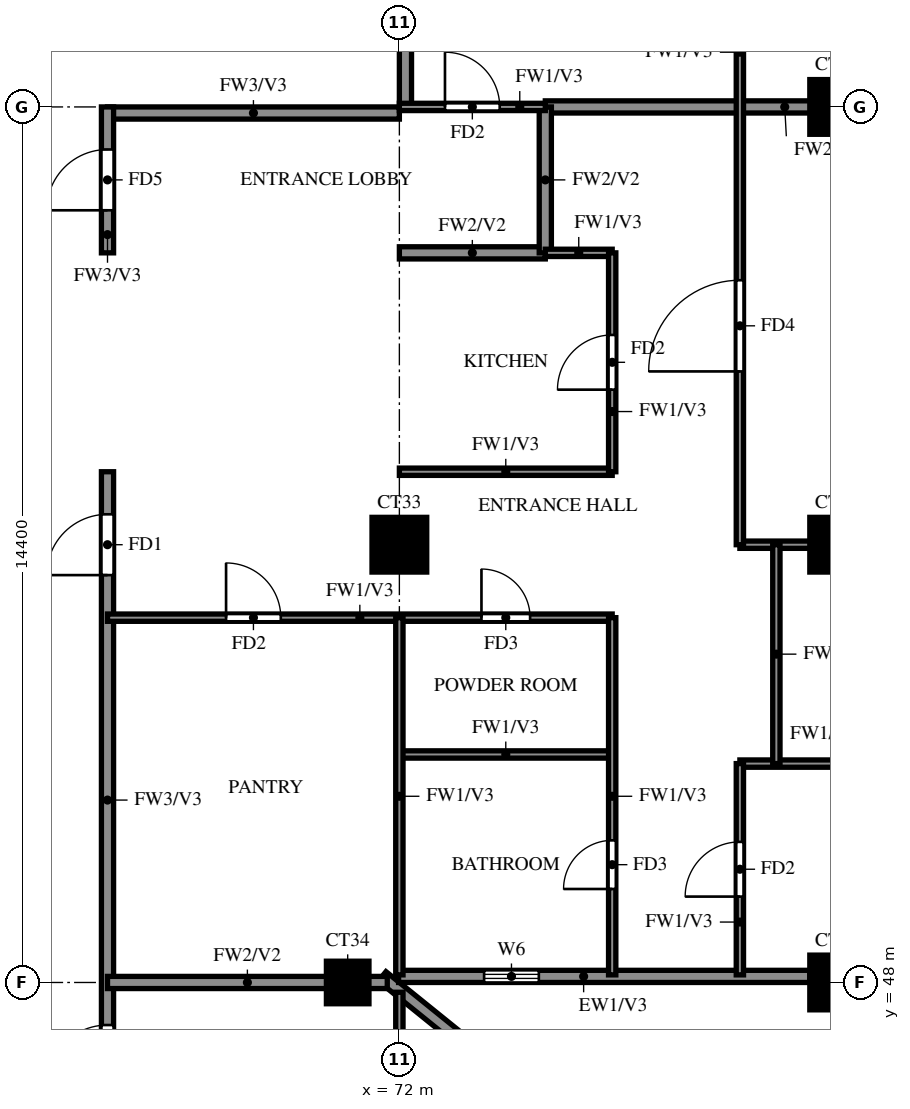
"""IFC4 building model, lengths in metres.
Left out: names, types, materials, properties, quantities, classifications, styles, units other than length and angle.
Written with IfcOpenShell. Run it as: python <this file> out.ifc"""

import sys

from ifc_helpers import new_model, si_unit, direction, frame, frame_2d, origin, origin_2d, place, context, subcontext, project, spatial, rectangle, extrude, source, transform, mapped, element, fill, save


model = new_model("IFC4")
c1 = context("Model", 3, precision=1e-05, world=origin(), true_north=direction((0.0, 1.0)))
c2 = subcontext(c1, "Body", "Model", "MODEL_VIEW")
j1 = project(units=[si_unit("LENGTHUNIT", "METRE"), si_unit("PLANEANGLEUNIT", "RADIAN")], contexts=[c1])
p1 = place(None, origin())
s1 = spatial("IfcSite", under=j1, at=p1, CompositionType="ELEMENT")
p2 = place(p1, origin())
s2 = spatial("IfcBuilding", under=s1, at=p2, CompositionType="ELEMENT")
p3 = place(p2, frame((0.0, 0.0, 229.0)))
s3 = spatial("IfcBuildingStorey", under=s2, at=p3, CompositionType="ELEMENT", Elevation=229.0)
m1 = source(origin(), c2, "Body", "SweptSolid", [
    extrude(rectangle(XDim=0.7, YDim=0.7, at=origin_2d()), origin(), (0.0, 0.0, 1.0), 3.22),
])
p4 = place(p3, frame((71.15, 48.0, 0.0), z_axis=(0.0, 0.0, 1.0), x_axis=(1.0, 0.0, 0.0)))
e1 = element("IfcColumn", 1, at=p4, inside=s3, PredefinedType="COLUMN", context=c2, shape_type="MappedRepresentation", body=[
    mapped(m1, transform((0.0, 0.0, 0.0))),
])
m2 = source(origin(), c2, "Body", "SweptSolid", [
    extrude(rectangle(XDim=0.9, YDim=0.9, at=origin_2d()), origin(), (0.0, 0.0, 1.0), 3.22),
])
for number, where, z_axis, x_axis in (
    (2, (79.2, 48.0, 0.0), (0.0, 0.0, 1.0), (1.0, 0.0, 0.0)),
    (3, (72.0, 55.2, 0.0), (0.0, 0.0, 1.0), (1.0, 0.0, 0.0)),
    (4, (79.2, 55.2, 0.0), (0.0, 0.0, 1.0), (1.0, 0.0, 0.0)),
    (5, (79.2, 62.4, 0.0), (0.0, 0.0, 1.0), (1.0, 0.0, 0.0)),
):
    element("IfcColumn", number, at=place(p3, frame(where, z_axis=z_axis, x_axis=x_axis)), inside=s3, PredefinedType="COLUMN", context=c2, shape_type="MappedRepresentation", body=[
        mapped(m2, transform((0.0, 0.0, 0.0))),
    ])
p5 = place(p3, frame((81.907, 39.87, 0.0), z_axis=(0.0, 0.0, 1.0), x_axis=(-0.777936274417, 0.62834318087, 0.0)))
e6 = element("IfcWall", 6, at=p5, inside=s3, PredefinedType="SOLIDWALL", context=c2, shape_type="SweptSolid", body=[
    extrude(rectangle(XDim=13.099, YDim=0.2, at=frame_2d((6.549, 0.0))), origin(), (0.0, 0.0, 1.0), 3.22),
])
p6 = place(p5, frame((9.938, 0.0, 1.5)))
e7 = element("IfcOpeningElement", 7, at=p6, cuts=e6, PredefinedType="OPENING", context=c2, shape_type="SweptSolid", body=[
    extrude(rectangle(XDim=0.9, YDim=0.9, at=frame_2d((0.45, 0.45))), frame((0.0, 0.11, 0.0), z_axis=(0.0, -1.0, 0.0), x_axis=(1.0, 0.0, 0.0)), (0.0, 0.0, 1.0), 0.22),
])
p7 = place(p3, frame((71.987, 48.1, 0.0), z_axis=(0.0, 0.0, 1.0), x_axis=(1.0, 0.0, 0.0)))
e8 = element("IfcWall", 8, at=p7, inside=s3, PredefinedType="SOLIDWALL", context=c2, shape_type="SweptSolid", body=[
    extrude(rectangle(XDim=6.763, YDim=0.2, at=frame_2d((3.381, 0.0))), origin(), (0.0, 0.0, 1.0), 3.22),
])
p8 = place(p7, frame((1.406, 0.0, 1.5)))
e9 = element("IfcOpeningElement", 9, at=p8, cuts=e8, PredefinedType="OPENING", context=c2, shape_type="SweptSolid", body=[
    extrude(rectangle(XDim=0.9, YDim=0.9, at=frame_2d((0.45, 0.45))), frame((0.0, 0.11, 0.0), z_axis=(0.0, -1.0, 0.0), x_axis=(1.0, 0.0, 0.0)), (0.0, 0.0, 1.0), 0.22),
])
p9 = place(p3, frame((67.2, 62.3, 0.0), z_axis=(0.0, 0.0, 1.0), x_axis=(1.0, 0.0, 0.0)))
e10 = element("IfcWall", 10, at=p9, inside=s3, PredefinedType="SOLIDWALL", context=c2, shape_type="SweptSolid", body=[
    extrude(rectangle(XDim=4.8, YDim=0.2, at=frame_2d((2.4, 0.0))), origin(), (0.0, 0.0, 1.0), 3.22),
])
p10 = place(p3, frame((67.2, 45.6, 0.0), z_axis=(0.0, 0.0, 1.0), x_axis=(0.0, 1.0, 0.0)))
e11 = element("IfcWall", 11, at=p10, inside=s3, PredefinedType="SOLIDWALL", context=c2, shape_type="SweptSolid", body=[
    extrude(rectangle(XDim=10.8, YDim=0.2, at=frame_2d((5.4, 0.0))), origin(), (0.0, 0.0, 1.0), 3.22),
])
p11 = place(p10, frame((9.1, 0.0, 0.0)))
e12 = element("IfcOpeningElement", 12, at=p11, cuts=e11, PredefinedType="OPENING", context=c2, shape_type="SweptSolid", body=[
    extrude(rectangle(XDim=1.0, YDim=2.1, at=frame_2d((0.5, 1.05))), frame((0.0, 0.11, 0.0), z_axis=(0.0, -1.0, 0.0), x_axis=(1.0, 0.0, 0.0)), (0.0, 0.0, 1.0), 0.22),
])
p12 = place(p10, frame((0.7, 0.0, 0.0)))
e13 = element("IfcOpeningElement", 13, at=p12, cuts=e11, PredefinedType="OPENING", context=c2, shape_type="SweptSolid", body=[
    extrude(rectangle(XDim=1.0, YDim=2.1, at=frame_2d((0.5, 1.05))), frame((0.0, 0.11, 0.0), z_axis=(0.0, -1.0, 0.0), x_axis=(1.0, 0.0, 0.0)), (0.0, 0.0, 1.0), 0.22),
])
p13 = place(p3, frame((67.2, 60.0, 0.0), z_axis=(0.0, 0.0, 1.0), x_axis=(0.0, 1.0, 0.0)))
e14 = element("IfcWall", 14, at=p13, inside=s3, PredefinedType="SOLIDWALL", context=c2, shape_type="SweptSolid", body=[
    extrude(rectangle(XDim=2.4, YDim=0.2, at=frame_2d((1.2, 0.0))), origin(), (0.0, 0.0, 1.0), 3.22),
])
p14 = place(p13, frame((0.7, 0.0, 0.0)))
e15 = element("IfcOpeningElement", 15, at=p14, cuts=e14, PredefinedType="OPENING", context=c2, shape_type="SweptSolid", body=[
    extrude(rectangle(XDim=1.0, YDim=2.1, at=frame_2d((0.5, 1.05))), frame((0.0, 0.11, 0.0), z_axis=(0.0, -1.0, 0.0), x_axis=(1.0, 0.0, 0.0)), (0.0, 0.0, 1.0), 0.22),
])
p15 = place(p3, frame((72.1, 62.4, 0.0), z_axis=(0.0, 0.0, 1.0), x_axis=(0.0, 1.0, 0.0)))
e16 = element("IfcWall", 16, at=p15, inside=s3, PredefinedType="SOLIDWALL", context=c2, shape_type="SweptSolid", body=[
    extrude(rectangle(XDim=15.6, YDim=0.2, at=frame_2d((7.8, 0.0))), origin(), (0.0, 0.0, 1.0), 3.22),
])
p16 = place(p3, frame((67.2, 48.0, 0.0), z_axis=(0.0, 0.0, 1.0), x_axis=(1.0, 0.0, 0.0)))
e17 = element("IfcWall", 17, at=p16, inside=s3, PredefinedType="SOLIDWALL", context=c2, shape_type="SweptSolid", body=[
    extrude(rectangle(XDim=4.601, YDim=0.2, at=frame_2d((2.301, 0.0))), origin(), (0.0, 0.0, 1.0), 3.22),
])
p17 = place(p3, frame((72.0, 60.0, 0.0), z_axis=(0.0, 0.0, 1.0), x_axis=(1.0, 0.0, 0.0)))
e18 = element("IfcWall", 18, at=p17, inside=s3, PredefinedType="SOLIDWALL", context=c2, shape_type="SweptSolid", body=[
    extrude(rectangle(XDim=2.4, YDim=0.2, at=frame_2d((1.2, 0.0))), origin(), (0.0, 0.0, 1.0), 3.22),
])
p18 = place(p3, frame((74.4, 62.4, 0.0), z_axis=(0.0, 0.0, 1.0), x_axis=(1.0, 0.0, 0.0)))
e19 = element("IfcWall", 19, at=p18, inside=s3, PredefinedType="SOLIDWALL", context=c2, shape_type="SweptSolid", body=[
    extrude(rectangle(XDim=7.875, YDim=0.2, at=frame_2d((3.938, 0.0))), origin(), (0.0, 0.0, 1.0), 3.22),
])
p19 = place(p3, frame((74.4, 60.0, 0.0), z_axis=(0.0, 0.0, 1.0), x_axis=(0.0, 1.0, 0.0)))
e20 = element("IfcWall", 20, at=p19, inside=s3, PredefinedType="SOLIDWALL", context=c2, shape_type="SweptSolid", body=[
    extrude(rectangle(XDim=2.4, YDim=0.2, at=frame_2d((1.2, 0.0))), origin(), (0.0, 0.0, 1.0), 3.22),
])
p20 = place(p3, frame((77.6, 51.6, 0.0), z_axis=(0.0, 0.0, 1.0), x_axis=(1.0, 0.0, 0.0)))
e21 = element("IfcWall", 21, at=p20, inside=s3, PredefinedType="PARTITIONING", context=c2, shape_type="SweptSolid", body=[
    extrude(rectangle(XDim=4.675, YDim=0.12, at=frame_2d((2.337, 0.0))), origin(), (0.0, 0.0, 1.0), 2.32),
])
p21 = place(p20, frame((2.238, 0.0, 0.0)))
e22 = element("IfcOpeningElement", 22, at=p21, cuts=e21, PredefinedType="OPENING", context=c2, shape_type="SweptSolid", body=[
    extrude(rectangle(XDim=0.8, YDim=2.1, at=frame_2d((0.4, 1.05))), frame((0.0, 0.07, 0.0), z_axis=(0.0, -1.0, 0.0), x_axis=(1.0, 0.0, 0.0)), (0.0, 0.0, 1.0), 0.14),
])
p22 = place(p3, frame((72.0, 51.75, 0.0), z_axis=(0.0, 0.0, 1.0), x_axis=(1.0, 0.0, 0.0)))
e23 = element("IfcWall", 23, at=p22, inside=s3, PredefinedType="PARTITIONING", context=c2, shape_type="SweptSolid", body=[
    extrude(rectangle(XDim=3.5, YDim=0.12, at=frame_2d((1.75, 0.0))), origin(), (0.0, 0.0, 1.0), 3.22),
])
p23 = place(p3, frame((67.2, 54.0, 0.0), z_axis=(0.0, 0.0, 1.0), x_axis=(1.0, 0.0, 0.0)))
e24 = element("IfcWall", 24, at=p23, inside=s3, PredefinedType="PARTITIONING", context=c2, shape_type="SweptSolid", body=[
    extrude(rectangle(XDim=8.3, YDim=0.12, at=frame_2d((4.15, 0.0))), origin(), (0.0, 0.0, 1.0), 3.22),
])
p24 = place(p23, frame((6.15, 0.0, 0.0)))
e25 = element("IfcOpeningElement", 25, at=p24, cuts=e24, PredefinedType="OPENING", context=c2, shape_type="SweptSolid", body=[
    extrude(rectangle(XDim=0.8, YDim=2.1, at=frame_2d((0.4, 1.05))), frame((0.0, 0.07, 0.0), z_axis=(0.0, -1.0, 0.0), x_axis=(1.0, 0.0, 0.0)), (0.0, 0.0, 1.0), 0.14),
])
p25 = place(p23, frame((1.95, 0.0, 0.0)))
e26 = element("IfcOpeningElement", 26, at=p25, cuts=e24, PredefinedType="OPENING", context=c2, shape_type="SweptSolid", body=[
    extrude(rectangle(XDim=0.9, YDim=2.1, at=frame_2d((0.45, 1.05))), frame((0.0, 0.07, 0.0), z_axis=(0.0, -1.0, 0.0), x_axis=(1.0, 0.0, 0.0)), (0.0, 0.0, 1.0), 0.14),
])
p26 = place(p3, frame((77.6, 55.2, 0.0), z_axis=(0.0, 0.0, 1.0), x_axis=(1.0, 0.0, 0.0)))
e27 = element("IfcWall", 27, at=p26, inside=s3, PredefinedType="PARTITIONING", context=c2, shape_type="SweptSolid", body=[
    extrude(rectangle(XDim=4.675, YDim=0.12, at=frame_2d((2.337, 0.0))), origin(), (0.0, 0.0, 1.0), 3.22),
])
p27 = place(p3, frame((72.0, 56.4, 0.0), z_axis=(0.0, 0.0, 1.0), x_axis=(1.0, 0.0, 0.0)))
e28 = element("IfcWall", 28, at=p27, inside=s3, PredefinedType="PARTITIONING", context=c2, shape_type="SweptSolid", body=[
    extrude(rectangle(XDim=3.5, YDim=0.12, at=frame_2d((1.75, 0.0))), origin(), (0.0, 0.0, 1.0), 3.22),
])
p28 = place(p3, frame((74.4, 60.0, 0.0), z_axis=(0.0, 0.0, 1.0), x_axis=(1.0, 0.0, 0.0)))
e29 = element("IfcWall", 29, at=p28, inside=s3, PredefinedType="PARTITIONING", context=c2, shape_type="SweptSolid", body=[
    extrude(rectangle(XDim=1.1, YDim=0.12, at=frame_2d((0.55, 0.0))), origin(), (0.0, 0.0, 1.0), 3.22),
])
p29 = place(p3, frame((72.0, 62.4, 0.0), z_axis=(0.0, 0.0, 1.0), x_axis=(1.0, 0.0, 0.0)))
e30 = element("IfcWall", 30, at=p29, inside=s3, PredefinedType="PARTITIONING", context=c2, shape_type="SweptSolid", body=[
    extrude(rectangle(XDim=2.4, YDim=0.12, at=frame_2d((1.2, 0.0))), origin(), (0.0, 0.0, 1.0), 3.22),
])
p30 = place(p29, frame((0.75, 0.0, 0.0)))
e31 = element("IfcOpeningElement", 31, at=p30, cuts=e30, PredefinedType="OPENING", context=c2, shape_type="SweptSolid", body=[
    extrude(rectangle(XDim=0.9, YDim=2.1, at=frame_2d((0.45, 1.05))), frame((0.0, 0.07, 0.0), z_axis=(0.0, -1.0, 0.0), x_axis=(1.0, 0.0, 0.0)), (0.0, 0.0, 1.0), 0.14),
])
p31 = place(p3, frame((72.0, 39.725, 0.0), z_axis=(0.0, 0.0, 1.0), x_axis=(0.0, 1.0, 0.0)))
e32 = element("IfcWall", 32, at=p31, inside=s3, PredefinedType="PARTITIONING", context=c2, shape_type="SweptSolid", body=[
    extrude(rectangle(XDim=8.114, YDim=0.12, at=frame_2d((4.057, 0.0))), origin(), (0.0, 0.0, 1.0), 2.32),
])
p32 = place(p31, frame((1.788, 0.0, 0.0)))
e33 = element("IfcOpeningElement", 33, at=p32, cuts=e32, PredefinedType="OPENING", context=c2, shape_type="SweptSolid", body=[
    extrude(rectangle(XDim=0.9, YDim=2.1, at=frame_2d((0.45, 1.05))), frame((0.0, 0.07, 0.0), z_axis=(0.0, -1.0, 0.0), x_axis=(1.0, 0.0, 0.0)), (0.0, 0.0, 1.0), 0.14),
])
p33 = place(p31, frame((4.575, 0.0, 0.0)))
e34 = element("IfcOpeningElement", 34, at=p33, cuts=e32, PredefinedType="OPENING", context=c2, shape_type="SweptSolid", body=[
    extrude(rectangle(XDim=0.8, YDim=2.1, at=frame_2d((0.4, 1.05))), frame((0.0, 0.07, 0.0), z_axis=(0.0, -1.0, 0.0), x_axis=(1.0, 0.0, 0.0)), (0.0, 0.0, 1.0), 0.14),
])
p34 = place(p3, frame((72.0, 48.125, 0.0), z_axis=(0.0, 0.0, 1.0), x_axis=(0.0, 1.0, 0.0)))
e35 = element("IfcWall", 35, at=p34, inside=s3, PredefinedType="PARTITIONING", context=c2, shape_type="SweptSolid", body=[
    extrude(rectangle(XDim=5.875, YDim=0.12, at=frame_2d((2.938, 0.0))), origin(), (0.0, 0.0, 1.0), 3.22),
])
p35 = place(p3, frame((75.5, 48.125, 0.0), z_axis=(0.0, 0.0, 1.0), x_axis=(0.0, 1.0, 0.0)))
e36 = element("IfcWall", 36, at=p35, inside=s3, PredefinedType="PARTITIONING", context=c2, shape_type="SweptSolid", body=[
    extrude(rectangle(XDim=5.875, YDim=0.12, at=frame_2d((2.938, 0.0))), origin(), (0.0, 0.0, 1.0), 3.22),
])
p36 = place(p35, frame((1.413, 0.0, 0.0)))
e37 = element("IfcOpeningElement", 37, at=p36, cuts=e36, PredefinedType="OPENING", context=c2, shape_type="SweptSolid", body=[
    extrude(rectangle(XDim=0.8, YDim=2.1, at=frame_2d((0.4, 1.05))), frame((0.0, 0.07, 0.0), z_axis=(0.0, -1.0, 0.0), x_axis=(1.0, 0.0, 0.0)), (0.0, 0.0, 1.0), 0.14),
])
p37 = place(p3, frame((75.5, 56.4, 0.0), z_axis=(0.0, 0.0, 1.0), x_axis=(0.0, 1.0, 0.0)))
e38 = element("IfcWall", 38, at=p37, inside=s3, PredefinedType="PARTITIONING", context=c2, shape_type="SweptSolid", body=[
    extrude(rectangle(XDim=3.6, YDim=0.12, at=frame_2d((1.8, 0.0))), origin(), (0.0, 0.0, 1.0), 3.22),
])
p38 = place(p37, frame((1.35, 0.0, 0.0)))
e39 = element("IfcOpeningElement", 39, at=p38, cuts=e38, PredefinedType="OPENING", context=c2, shape_type="SweptSolid", body=[
    extrude(rectangle(XDim=0.9, YDim=2.1, at=frame_2d((0.45, 1.05))), frame((0.0, 0.07, 0.0), z_axis=(0.0, -1.0, 0.0), x_axis=(1.0, 0.0, 0.0)), (0.0, 0.0, 1.0), 0.14),
])
p39 = place(p3, frame((77.6, 48.125, 0.0), z_axis=(0.0, 0.0, 1.0), x_axis=(0.0, 1.0, 0.0)))
e40 = element("IfcWall", 40, at=p39, inside=s3, PredefinedType="PARTITIONING", context=c2, shape_type="SweptSolid", body=[
    extrude(rectangle(XDim=3.475, YDim=0.12, at=frame_2d((1.738, 0.0))), origin(), (0.0, 0.0, 1.0), 3.22),
])
p40 = place(p39, frame((1.288, 0.0, 0.0)))
e41 = element("IfcOpeningElement", 41, at=p40, cuts=e40, PredefinedType="OPENING", context=c2, shape_type="SweptSolid", body=[
    extrude(rectangle(XDim=0.9, YDim=2.1, at=frame_2d((0.45, 1.05))), frame((0.0, 0.07, 0.0), z_axis=(0.0, -1.0, 0.0), x_axis=(1.0, 0.0, 0.0)), (0.0, 0.0, 1.0), 0.14),
])
p41 = place(p3, frame((77.6, 55.2, 0.0), z_axis=(0.0, 0.0, 1.0), x_axis=(0.0, 1.0, 0.0)))
e42 = element("IfcWall", 42, at=p41, inside=s3, PredefinedType="PARTITIONING", context=c2, shape_type="SweptSolid", body=[
    extrude(rectangle(XDim=18.0, YDim=0.12, at=frame_2d((9.0, 0.0))), origin(), (0.0, 0.0, 1.0), 3.22),
])
p42 = place(p41, frame((2.85, 0.0, 0.0)))
e43 = element("IfcOpeningElement", 43, at=p42, cuts=e42, PredefinedType="OPENING", context=c2, shape_type="SweptSolid", body=[
    extrude(rectangle(XDim=1.5, YDim=2.1, at=frame_2d((0.75, 1.05))), frame((0.0, 0.07, 0.0), z_axis=(0.0, -1.0, 0.0), x_axis=(1.0, 0.0, 0.0)), (0.0, 0.0, 1.0), 0.14),
])
p43 = place(p41, frame((8.55, 0.0, 0.0)))
e44 = element("IfcOpeningElement", 44, at=p43, cuts=e42, PredefinedType="OPENING", context=c2, shape_type="SweptSolid", body=[
    extrude(rectangle(XDim=0.9, YDim=2.1, at=frame_2d((0.45, 1.05))), frame((0.0, 0.07, 0.0), z_axis=(0.0, -1.0, 0.0), x_axis=(1.0, 0.0, 0.0)), (0.0, 0.0, 1.0), 0.14),
])
p44 = place(p41, frame((12.15, 0.0, 0.0)))
e45 = element("IfcOpeningElement", 45, at=p44, cuts=e42, PredefinedType="OPENING", context=c2, shape_type="SweptSolid", body=[
    extrude(rectangle(XDim=0.9, YDim=2.1, at=frame_2d((0.45, 1.05))), frame((0.0, 0.07, 0.0), z_axis=(0.0, -1.0, 0.0), x_axis=(1.0, 0.0, 0.0)), (0.0, 0.0, 1.0), 0.14),
])
p45 = place(p41, frame((15.75, 0.0, 0.0)))
e46 = element("IfcOpeningElement", 46, at=p45, cuts=e42, PredefinedType="OPENING", context=c2, shape_type="SweptSolid", body=[
    extrude(rectangle(XDim=0.9, YDim=2.1, at=frame_2d((0.45, 1.05))), frame((0.0, 0.07, 0.0), z_axis=(0.0, -1.0, 0.0), x_axis=(1.0, 0.0, 0.0)), (0.0, 0.0, 1.0), 0.14),
])
p46 = place(p3, frame((78.2, 51.6, 0.0), z_axis=(0.0, 0.0, 1.0), x_axis=(0.0, 1.0, 0.0)))
e47 = element("IfcWall", 47, at=p46, inside=s3, PredefinedType="PARTITIONING", context=c2, shape_type="SweptSolid", body=[
    extrude(rectangle(XDim=3.6, YDim=0.12, at=frame_2d((1.8, 0.0))), origin(), (0.0, 0.0, 1.0), 3.22),
])
p47 = place(p8, origin())
e48 = element("IfcWindow", 48, at=p47, inside=s3, PartitioningType="SINGLE_PANEL", PredefinedType="WINDOW", context=c2, shape_type="SweptSolid", body=[
    extrude(rectangle(XDim=0.9, YDim=0.9, at=frame_2d((0.45, 0.45))), frame((0.0, 0.03, 0.0), z_axis=(0.0, -1.0, 0.0), x_axis=(1.0, 0.0, 0.0)), (0.0, 0.0, 1.0), 0.06),
])
fill(e9, e48)
p48 = place(p11, origin())
e49 = element("IfcDoor", 49, at=p48, inside=s3, OperationType="SINGLE_SWING_LEFT", PredefinedType="DOOR", context=c2, shape_type="SweptSolid", body=[
    extrude(rectangle(XDim=1.0, YDim=2.1, at=frame_2d((0.5, 1.05))), frame((0.0, 0.025, 0.0), z_axis=(0.0, -1.0, 0.0), x_axis=(1.0, 0.0, 0.0)), (0.0, 0.0, 1.0), 0.05),
])
fill(e12, e49)
p49 = place(p40, origin())
e50 = element("IfcDoor", 50, at=p49, inside=s3, OperationType="SINGLE_SWING_LEFT", PredefinedType="DOOR", context=c2, shape_type="SweptSolid", body=[
    extrude(rectangle(XDim=0.9, YDim=2.1, at=frame_2d((0.45, 1.05))), frame((0.0, 0.025, 0.0), z_axis=(0.0, -1.0, 0.0), x_axis=(1.0, 0.0, 0.0)), (0.0, 0.0, 1.0), 0.05),
])
fill(e41, e50)
p50 = place(p42, origin())
e51 = element("IfcDoor", 51, at=p50, inside=s3, OperationType="SINGLE_SWING_LEFT", PredefinedType="DOOR", context=c2, shape_type="SweptSolid", body=[
    extrude(rectangle(XDim=1.5, YDim=2.1, at=frame_2d((0.75, 1.05))), frame((0.0, 0.025, 0.0), z_axis=(0.0, -1.0, 0.0), x_axis=(1.0, 0.0, 0.0)), (0.0, 0.0, 1.0), 0.05),
])
fill(e43, e51)
p51 = place(p36, origin())
e52 = element("IfcDoor", 52, at=p51, inside=s3, OperationType="SINGLE_SWING_LEFT", PredefinedType="DOOR", context=c2, shape_type="SweptSolid", body=[
    extrude(rectangle(XDim=0.8, YDim=2.1, at=frame_2d((0.4, 1.05))), frame((0.0, 0.025, 0.0), z_axis=(0.0, -1.0, 0.0), x_axis=(1.0, 0.0, 0.0)), (0.0, 0.0, 1.0), 0.05),
])
fill(e37, e52)
p52 = place(p24, origin())
e53 = element("IfcDoor", 53, at=p52, inside=s3, OperationType="SINGLE_SWING_RIGHT", PredefinedType="DOOR", context=c2, shape_type="SweptSolid", body=[
    extrude(rectangle(XDim=0.8, YDim=2.1, at=frame_2d((0.4, 1.05))), frame((0.0, 0.025, 0.0), z_axis=(0.0, -1.0, 0.0), x_axis=(1.0, 0.0, 0.0)), (0.0, 0.0, 1.0), 0.05),
])
fill(e25, e53)
p53 = place(p38, origin())
e54 = element("IfcDoor", 54, at=p53, inside=s3, OperationType="SINGLE_SWING_LEFT", PredefinedType="DOOR", context=c2, shape_type="SweptSolid", body=[
    extrude(rectangle(XDim=0.9, YDim=2.1, at=frame_2d((0.45, 1.05))), frame((0.0, 0.025, 0.0), z_axis=(0.0, -1.0, 0.0), x_axis=(1.0, 0.0, 0.0)), (0.0, 0.0, 1.0), 0.05),
])
fill(e39, e54)
p54 = place(p25, origin())
e55 = element("IfcDoor", 55, at=p54, inside=s3, OperationType="SINGLE_SWING_LEFT", PredefinedType="DOOR", context=c2, shape_type="SweptSolid", body=[
    extrude(rectangle(XDim=0.9, YDim=2.1, at=frame_2d((0.45, 1.05))), frame((0.0, 0.025, 0.0), z_axis=(0.0, -1.0, 0.0), x_axis=(1.0, 0.0, 0.0)), (0.0, 0.0, 1.0), 0.05),
])
fill(e26, e55)
p55 = place(p30, origin())
e56 = element("IfcDoor", 56, at=p55, inside=s3, OperationType="SINGLE_SWING_LEFT", PredefinedType="DOOR", context=c2, shape_type="SweptSolid", body=[
    extrude(rectangle(XDim=0.9, YDim=2.1, at=frame_2d((0.45, 1.05))), frame((0.0, 0.025, 0.0), z_axis=(0.0, -1.0, 0.0), x_axis=(1.0, 0.0, 0.0)), (0.0, 0.0, 1.0), 0.05),
])
fill(e31, e56)
p56 = place(p14, origin())
e57 = element("IfcDoor", 57, at=p56, inside=s3, OperationType="SINGLE_SWING_RIGHT", PredefinedType="DOOR", context=c2, shape_type="SweptSolid", body=[
    extrude(rectangle(XDim=1.0, YDim=2.1, at=frame_2d((0.5, 1.05))), frame((0.0, 0.025, 0.0), z_axis=(0.0, -1.0, 0.0), x_axis=(1.0, 0.0, 0.0)), (0.0, 0.0, 1.0), 0.05),
])
fill(e15, e57)
p57 = place(p12, origin())
e58 = element("IfcDoor", 58, at=p57, inside=s3, OperationType="SINGLE_SWING_RIGHT", PredefinedType="DOOR", context=c2, shape_type="SweptSolid", body=[
    extrude(rectangle(XDim=1.0, YDim=2.1, at=frame_2d((0.5, 1.05))), frame((0.0, 0.025, 0.0), z_axis=(0.0, -1.0, 0.0), x_axis=(1.0, 0.0, 0.0)), (0.0, 0.0, 1.0), 0.05),
])
fill(e13, e58)
save(model, sys.argv[1])
